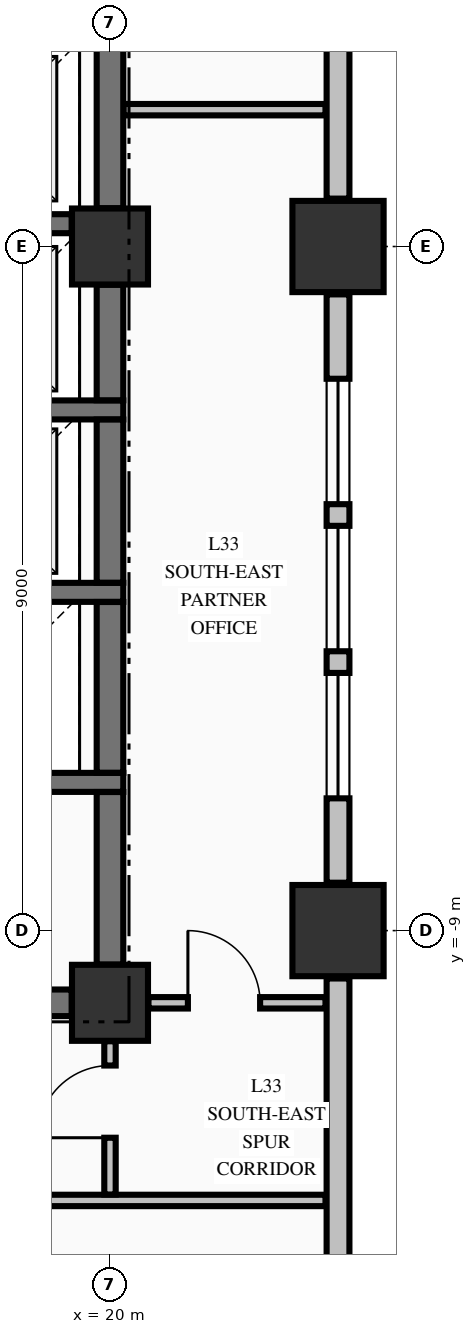
"""IFC4 building model, lengths in metres.
Left out: names, types, materials, properties, quantities, classifications, styles, units other than length and angle.
Written with IfcOpenShell. Run it as: python <this file> out.ifc"""

import sys

from ifc_helpers import new_model, si_unit, direction, frame, frame_2d, origin, origin_2d, place, context, subcontext, project, spatial, rectangle, extrude, element, fill, save


model = new_model("IFC4")
c1 = context("Model", 3, precision=1e-05, world=origin(), true_north=direction((0.0, 1.0)))
c2 = subcontext(c1, "Body", "Model", "MODEL_VIEW")
j1 = project(units=[si_unit("LENGTHUNIT", "METRE"), si_unit("PLANEANGLEUNIT", "RADIAN")], contexts=[c1])
p1 = place(None, origin())
s1 = spatial("IfcSite", under=j1, at=p1, CompositionType="ELEMENT")
p2 = place(p1, origin())
s2 = spatial("IfcBuilding", under=s1, at=p2, CompositionType="ELEMENT")
p3 = place(p2, frame((0.0, 0.0, 132.06)))
s3 = spatial("IfcBuildingStorey", under=s2, at=p3, CompositionType="ELEMENT", Elevation=132.06)
for number, where, z_axis, x_axis in (
    (1, (23.0, -9.0, -0.25), (0.0, 0.0, 1.0), (1.0, 0.0, 0.0)),
    (2, (23.0, 0.0, -0.25), (0.0, 0.0, 1.0), (1.0, 0.0, 0.0)),
):
    element("IfcColumn", number, at=place(p3, frame(where, z_axis=z_axis, x_axis=x_axis)), inside=s3, PredefinedType="COLUMN", context=c2, shape_type="SweptSolid", body=[
        extrude(rectangle(XDim=1.2, YDim=1.2, at=origin_2d()), origin(), (0.0, 0.0, 1.0), 3.57),
    ])
for number, where, z_axis, x_axis in (
    (3, (20.0, -9.95, -0.25), (0.0, 0.0, 1.0), (1.0, 0.0, 0.0)),
    (4, (20.0, 0.0, -0.25), (0.0, 0.0, 1.0), (1.0, 0.0, 0.0)),
):
    element("IfcColumn", number, at=place(p3, frame(where, z_axis=z_axis, x_axis=x_axis)), inside=s3, PredefinedType="COLUMN", context=c2, shape_type="SweptSolid", body=[
        extrude(rectangle(XDim=1.0, YDim=1.0, at=origin_2d()), origin(), (0.0, 0.0, 1.0), 3.57),
    ])
p4 = place(p3, frame((23.0, -20.37, 0.0), z_axis=(0.0, 0.0, 1.0), x_axis=(0.0, 1.0, 0.0)))
e5 = element("IfcWall", 5, at=p4, inside=s3, PredefinedType="STANDARD", context=c2, shape_type="SweptSolid", body=[
    extrude(rectangle(XDim=10.74, YDim=0.3, at=frame_2d((5.37, 0.0))), origin(), (0.0, 0.0, 1.0), 2.712),
])
p5 = place(p3, frame((23.0, -8.37, 0.0), z_axis=(0.0, 0.0, 1.0), x_axis=(0.0, 1.0, 0.0)))
e6 = element("IfcWall", 6, at=p5, inside=s3, PredefinedType="STANDARD", context=c2, shape_type="SweptSolid", body=[
    extrude(rectangle(XDim=7.74, YDim=0.3, at=frame_2d((3.87, 0.0))), origin(), (0.0, 0.0, 1.0), 2.712),
])
p6 = place(p5, frame((1.11, 0.0, 0.8)))
e7 = element("IfcOpeningElement", 7, at=p6, cuts=e6, PredefinedType="OPENING", context=c2, shape_type="SweptSolid", body=[
    extrude(rectangle(XDim=1.65, YDim=1.7, at=frame_2d((0.825, 0.85))), frame((0.0, 0.16, 0.0), z_axis=(0.0, -1.0, 0.0), x_axis=(1.0, 0.0, 0.0)), (0.0, 0.0, 1.0), 0.32),
])
p7 = place(p5, frame((3.045, 0.0, 0.8)))
e8 = element("IfcOpeningElement", 8, at=p7, cuts=e6, PredefinedType="OPENING", context=c2, shape_type="SweptSolid", body=[
    extrude(rectangle(XDim=1.65, YDim=1.7, at=frame_2d((0.825, 0.85))), frame((0.0, 0.16, 0.0), z_axis=(0.0, -1.0, 0.0), x_axis=(1.0, 0.0, 0.0)), (0.0, 0.0, 1.0), 0.32),
])
p8 = place(p5, frame((4.98, 0.0, 0.8)))
e9 = element("IfcOpeningElement", 9, at=p8, cuts=e6, PredefinedType="OPENING", context=c2, shape_type="SweptSolid", body=[
    extrude(rectangle(XDim=1.65, YDim=1.7, at=frame_2d((0.825, 0.85))), frame((0.0, 0.16, 0.0), z_axis=(0.0, -1.0, 0.0), x_axis=(1.0, 0.0, 0.0)), (0.0, 0.0, 1.0), 0.32),
])
p9 = place(p3, frame((23.0, 0.63, 0.0), z_axis=(0.0, 0.0, 1.0), x_axis=(0.0, 1.0, 0.0)))
e10 = element("IfcWall", 10, at=p9, inside=s3, PredefinedType="STANDARD", context=c2, shape_type="SweptSolid", body=[
    extrude(rectangle(XDim=7.74, YDim=0.3, at=frame_2d((3.87, 0.0))), origin(), (0.0, 0.0, 1.0), 2.712),
])
p10 = place(p9, frame((3.045, 0.0, 0.8)))
e11 = element("IfcOpeningElement", 11, at=p10, cuts=e10, PredefinedType="OPENING", context=c2, shape_type="SweptSolid", body=[
    extrude(rectangle(XDim=1.65, YDim=1.7, at=frame_2d((0.825, 0.85))), frame((0.0, 0.16, 0.0), z_axis=(0.0, -1.0, 0.0), x_axis=(1.0, 0.0, 0.0)), (0.0, 0.0, 1.0), 0.32),
])
p11 = place(p9, frame((4.98, 0.0, 0.8)))
e12 = element("IfcOpeningElement", 12, at=p11, cuts=e10, PredefinedType="OPENING", context=c2, shape_type="SweptSolid", body=[
    extrude(rectangle(XDim=1.65, YDim=1.7, at=frame_2d((0.825, 0.85))), frame((0.0, 0.16, 0.0), z_axis=(0.0, -1.0, 0.0), x_axis=(1.0, 0.0, 0.0)), (0.0, 0.0, 1.0), 0.32),
])
p12 = place(p3, frame((14.7, -9.95, 0.0), z_axis=(0.0, 0.0, 1.0), x_axis=(1.0, 0.0, 0.0)))
e13 = element("IfcWall", 13, at=p12, inside=s3, PredefinedType="SHEAR", context=c2, shape_type="SweptSolid", body=[
    extrude(rectangle(XDim=4.796, YDim=0.35, at=frame_2d((2.398, 0.0))), origin(), (0.0, 0.0, 1.0), 3.32),
])
p13 = place(p12, frame((0.65, 0.0, 0.0)))
e14 = element("IfcOpeningElement", 14, at=p13, cuts=e13, PredefinedType="OPENING", context=c2, shape_type="SweptSolid", body=[
    extrude(rectangle(XDim=1.2, YDim=2.15, at=frame_2d((0.6, 1.075))), frame((0.0, 0.185, 0.0), z_axis=(0.0, -1.0, 0.0), x_axis=(1.0, 0.0, 0.0)), (0.0, 0.0, 1.0), 0.37),
])
for number, where, z_axis, x_axis in (
    (15, (17.025, -7.05, 0.0), (0.0, 0.0, 1.0), (1.0, 0.0, 0.0)),
    (16, (17.025, -4.55, 0.0), (0.0, 0.0, 1.0), (1.0, 0.0, 0.0)),
    (17, (17.025, -2.15, 0.0), (0.0, 0.0, 1.0), (1.0, 0.0, 0.0)),
):
    element("IfcWall", number, at=place(p3, frame(where, z_axis=z_axis, x_axis=x_axis)), inside=s3, PredefinedType="SOLIDWALL", context=c2, shape_type="SweptSolid", body=[
        extrude(rectangle(XDim=3.15, YDim=0.25, at=frame_2d((1.575, 0.0))), origin(), (0.0, 0.0, 1.0), 3.32),
    ])
p14 = place(p3, frame((17.025, 0.3, 0.0), z_axis=(0.0, 0.0, 1.0), x_axis=(1.0, 0.0, 0.0)))
e18 = element("IfcWall", 18, at=p14, inside=s3, PredefinedType="SOLIDWALL", context=c2, shape_type="SweptSolid", body=[
    extrude(rectangle(XDim=2.471, YDim=0.25, at=frame_2d((1.236, 0.0))), origin(), (0.0, 0.0, 1.0), 3.32),
])
p15 = place(p3, frame((-27.835, -12.55, 0.0), z_axis=(0.0, 0.0, 1.0), x_axis=(1.0, 0.0, 0.0)))
e19 = element("IfcWall", 19, at=p15, inside=s3, PredefinedType="PARTITIONING", context=c2, shape_type="SweptSolid", body=[
    extrude(rectangle(XDim=50.67, YDim=0.15, at=frame_2d((25.335, 0.0))), origin(), (0.0, 0.0, 1.0), 3.32),
])
p16 = place(p15, frame((10.43, 0.0, 0.0)))
e20 = element("IfcOpeningElement", 20, at=p16, cuts=e19, PredefinedType="OPENING", context=c2, shape_type="SweptSolid", body=[
    extrude(rectangle(XDim=1.05, YDim=2.15, at=frame_2d((0.525, 1.075))), frame((0.0, 0.085, 0.0), z_axis=(0.0, -1.0, 0.0), x_axis=(1.0, 0.0, 0.0)), (0.0, 0.0, 1.0), 0.17),
])
p17 = place(p15, frame((15.06, 0.0, 0.0)))
e21 = element("IfcOpeningElement", 21, at=p17, cuts=e19, PredefinedType="OPENING", context=c2, shape_type="SweptSolid", body=[
    extrude(rectangle(XDim=0.95, YDim=2.15, at=frame_2d((0.475, 1.075))), frame((0.0, 0.085, 0.0), z_axis=(0.0, -1.0, 0.0), x_axis=(1.0, 0.0, 0.0)), (0.0, 0.0, 1.0), 0.17),
])
p18 = place(p15, frame((24.96, 0.0, 0.0)))
e22 = element("IfcOpeningElement", 22, at=p18, cuts=e19, PredefinedType="OPENING", context=c2, shape_type="SweptSolid", body=[
    extrude(rectangle(XDim=1.05, YDim=2.15, at=frame_2d((0.525, 1.075))), frame((0.0, 0.085, 0.0), z_axis=(0.0, -1.0, 0.0), x_axis=(1.0, 0.0, 0.0)), (0.0, 0.0, 1.0), 0.17),
])
p19 = place(p15, frame((33.01, 0.0, 0.0)))
e23 = element("IfcOpeningElement", 23, at=p19, cuts=e19, PredefinedType="OPENING", context=c2, shape_type="SweptSolid", body=[
    extrude(rectangle(XDim=0.95, YDim=2.15, at=frame_2d((0.475, 1.075))), frame((0.0, 0.085, 0.0), z_axis=(0.0, -1.0, 0.0), x_axis=(1.0, 0.0, 0.0)), (0.0, 0.0, 1.0), 0.17),
])
p20 = place(p15, frame((41.09, 0.0, 0.0)))
e24 = element("IfcOpeningElement", 24, at=p20, cuts=e19, PredefinedType="OPENING", context=c2, shape_type="SweptSolid", body=[
    extrude(rectangle(XDim=1.05, YDim=2.15, at=frame_2d((0.525, 1.075))), frame((0.0, 0.085, 0.0), z_axis=(0.0, -1.0, 0.0), x_axis=(1.0, 0.0, 0.0)), (0.0, 0.0, 1.0), 0.17),
])
p21 = place(p3, frame((20.506, -9.95, 0.0), z_axis=(0.0, 0.0, 1.0), x_axis=(1.0, 0.0, 0.0)))
e25 = element("IfcWall", 25, at=p21, inside=s3, PredefinedType="PARTITIONING", context=c2, shape_type="SweptSolid", body=[
    extrude(rectangle(XDim=2.329, YDim=0.15, at=frame_2d((1.165, 0.0))), origin(), (0.0, 0.0, 1.0), 3.32),
])
p22 = place(p21, frame((0.519, 0.0, 0.0)))
e26 = element("IfcOpeningElement", 26, at=p22, cuts=e25, PredefinedType="OPENING", context=c2, shape_type="SweptSolid", body=[
    extrude(rectangle(XDim=0.95, YDim=2.15, at=frame_2d((0.475, 1.075))), frame((0.0, 0.085, 0.0), z_axis=(0.0, -1.0, 0.0), x_axis=(1.0, 0.0, 0.0)), (0.0, 0.0, 1.0), 0.17),
])
p23 = place(p3, frame((20.178, 1.8, 0.0), z_axis=(0.0, 0.0, 1.0), x_axis=(1.0, 0.0, 0.0)))
e27 = element("IfcWall", 27, at=p23, inside=s3, PredefinedType="PARTITIONING", context=c2, shape_type="SweptSolid", body=[
    extrude(rectangle(XDim=2.657, YDim=0.15, at=frame_2d((1.329, 0.0))), origin(), (0.0, 0.0, 1.0), 3.32),
])
p24 = place(p3, frame((20.0, -9.446, 0.0), z_axis=(0.0, 0.0, 1.0), x_axis=(0.0, 1.0, 0.0)))
e28 = element("IfcWall", 28, at=p24, inside=s3, PredefinedType="SHEAR", context=c2, shape_type="SweptSolid", body=[
    extrude(rectangle(XDim=2.269, YDim=0.35, at=frame_2d((1.135, 0.0))), origin(), (0.0, 0.0, 1.0), 3.32),
])
p25 = place(p3, frame((20.0, -6.923, 0.0), z_axis=(0.0, 0.0, 1.0), x_axis=(0.0, 1.0, 0.0)))
e29 = element("IfcWall", 29, at=p25, inside=s3, PredefinedType="SHEAR", context=c2, shape_type="SweptSolid", body=[
    extrude(rectangle(XDim=2.246, YDim=0.35, at=frame_2d((1.123, 0.0))), origin(), (0.0, 0.0, 1.0), 3.32),
])
p26 = place(p3, frame((20.0, -4.423, 0.0), z_axis=(0.0, 0.0, 1.0), x_axis=(0.0, 1.0, 0.0)))
e30 = element("IfcWall", 30, at=p26, inside=s3, PredefinedType="SHEAR", context=c2, shape_type="SweptSolid", body=[
    extrude(rectangle(XDim=2.146, YDim=0.35, at=frame_2d((1.073, 0.0))), origin(), (0.0, 0.0, 1.0), 3.32),
])
p27 = place(p3, frame((20.0, -2.023, 0.0), z_axis=(0.0, 0.0, 1.0), x_axis=(0.0, 1.0, 0.0)))
e31 = element("IfcWall", 31, at=p27, inside=s3, PredefinedType="SHEAR", context=c2, shape_type="SweptSolid", body=[
    extrude(rectangle(XDim=1.519, YDim=0.35, at=frame_2d((0.76, 0.0))), origin(), (0.0, 0.0, 1.0), 3.32),
])
p28 = place(p3, frame((20.0, 0.504, 0.0), z_axis=(0.0, 0.0, 1.0), x_axis=(0.0, 1.0, 0.0)))
e32 = element("IfcWall", 32, at=p28, inside=s3, PredefinedType="SHEAR", context=c2, shape_type="SweptSolid", body=[
    extrude(rectangle(XDim=2.119, YDim=0.35, at=frame_2d((1.06, 0.0))), origin(), (0.0, 0.0, 1.0), 3.32),
])
p29 = place(p3, frame((20.0, -12.472, 0.0), z_axis=(0.0, 0.0, 1.0), x_axis=(0.0, 1.0, 0.0)))
e33 = element("IfcWall", 33, at=p29, inside=s3, PredefinedType="PARTITIONING", context=c2, shape_type="SweptSolid", body=[
    extrude(rectangle(XDim=2.016, YDim=0.15, at=frame_2d((1.008, 0.0))), origin(), (0.0, 0.0, 1.0), 2.81),
])
p30 = place(p29, frame((0.747, 0.0, 0.0)))
e34 = element("IfcOpeningElement", 34, at=p30, cuts=e33, PredefinedType="OPENING", context=c2, shape_type="SweptSolid", body=[
    extrude(rectangle(XDim=0.95, YDim=2.15, at=frame_2d((0.475, 1.075))), frame((0.0, 0.085, 0.0), z_axis=(0.0, -1.0, 0.0), x_axis=(1.0, 0.0, 0.0)), (0.0, 0.0, 1.0), 0.17),
])
p31 = place(p6, origin())
e35 = element("IfcWindow", 35, at=p31, inside=s3, PartitioningType="SINGLE_PANEL", PredefinedType="WINDOW", context=c2, shape_type="SweptSolid", body=[
    extrude(rectangle(XDim=1.65, YDim=1.7, at=frame_2d((0.825, 0.85))), frame((0.0, 0.03, 0.0), z_axis=(0.0, -1.0, 0.0), x_axis=(1.0, 0.0, 0.0)), (0.0, 0.0, 1.0), 0.06),
])
fill(e7, e35)
p32 = place(p7, origin())
e36 = element("IfcWindow", 36, at=p32, inside=s3, PartitioningType="SINGLE_PANEL", PredefinedType="WINDOW", context=c2, shape_type="SweptSolid", body=[
    extrude(rectangle(XDim=1.65, YDim=1.7, at=frame_2d((0.825, 0.85))), frame((0.0, 0.03, 0.0), z_axis=(0.0, -1.0, 0.0), x_axis=(1.0, 0.0, 0.0)), (0.0, 0.0, 1.0), 0.06),
])
fill(e8, e36)
p33 = place(p8, origin())
e37 = element("IfcWindow", 37, at=p33, inside=s3, PartitioningType="SINGLE_PANEL", PredefinedType="WINDOW", context=c2, shape_type="SweptSolid", body=[
    extrude(rectangle(XDim=1.65, YDim=1.7, at=frame_2d((0.825, 0.85))), frame((0.0, 0.03, 0.0), z_axis=(0.0, -1.0, 0.0), x_axis=(1.0, 0.0, 0.0)), (0.0, 0.0, 1.0), 0.06),
])
fill(e9, e37)
p34 = place(p30, origin())
e38 = element("IfcDoor", 38, at=p34, inside=s3, OperationType="SINGLE_SWING_LEFT", PredefinedType="DOOR", context=c2, shape_type="SweptSolid", body=[
    extrude(rectangle(XDim=0.95, YDim=2.15, at=frame_2d((0.475, 1.075))), frame((0.0, 0.025, 0.0), z_axis=(0.0, -1.0, 0.0), x_axis=(1.0, 0.0, 0.0)), (0.0, 0.0, 1.0), 0.05),
])
fill(e34, e38)
p35 = place(p22, origin())
e39 = element("IfcDoor", 39, at=p35, inside=s3, OperationType="SINGLE_SWING_LEFT", PredefinedType="DOOR", context=c2, shape_type="SweptSolid", body=[
    extrude(rectangle(XDim=0.95, YDim=2.15, at=frame_2d((0.475, 1.075))), frame((0.0, 0.025, 0.0), z_axis=(0.0, -1.0, 0.0), x_axis=(1.0, 0.0, 0.0)), (0.0, 0.0, 1.0), 0.05),
])
fill(e26, e39)
save(model, sys.argv[1])
